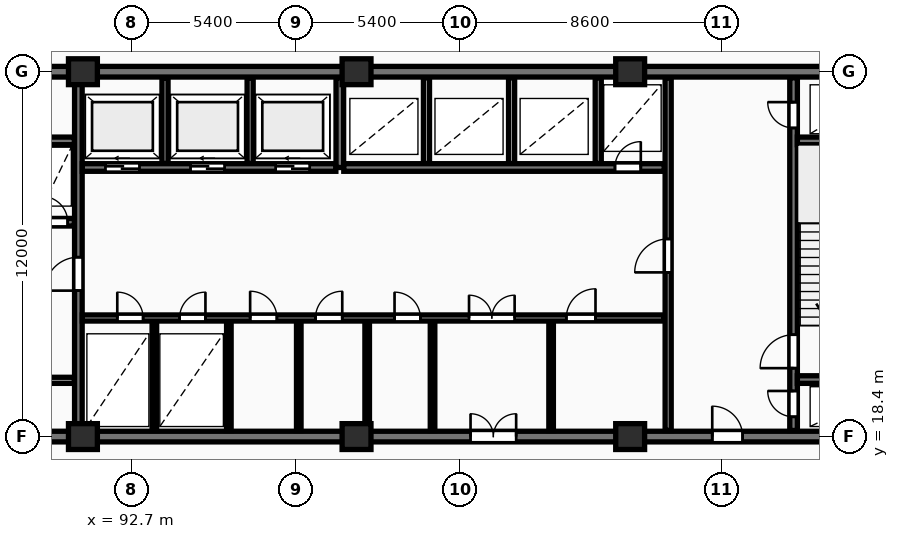
"""IFC4 building model, lengths in metres.
Left out: names, types, materials, properties, quantities, classifications, styles, units other than length and angle.
Written with IfcOpenShell. Run it as: python <this file> out.ifc"""

import sys

from ifc_helpers import new_model, si_unit, direction, frame, frame_2d, origin, origin_2d, place, context, subcontext, project, spatial, rectangle, extrude, element, fill, save


model = new_model("IFC4")
c1 = context("Model", 3, precision=1e-05, world=origin(), true_north=direction((0.0, 1.0)))
c2 = subcontext(c1, "Body", "Model", "MODEL_VIEW")
j1 = project(units=[si_unit("LENGTHUNIT", "METRE"), si_unit("PLANEANGLEUNIT", "RADIAN")], contexts=[c1])
p1 = place(None, origin())
s1 = spatial("IfcSite", under=j1, at=p1, CompositionType="ELEMENT")
p2 = place(p1, origin())
s2 = spatial("IfcBuilding", under=s1, at=p2, CompositionType="ELEMENT")
p3 = place(p2, frame((0.0, 0.0, 76.0)))
s3 = spatial("IfcBuildingStorey", under=s2, at=p3, CompositionType="ELEMENT", Elevation=76.0)
for number, where, z_axis, x_axis in (
    (1, (91.1, 18.4, 0.0), (0.0, 0.0, 1.0), (1.0, 0.0, 0.0)),
    (2, (91.1, 30.4, 0.0), (0.0, 0.0, 1.0), (1.0, 0.0, 0.0)),
    (3, (100.1, 18.4, 0.0), (0.0, 0.0, 1.0), (1.0, 0.0, 0.0)),
    (4, (100.1, 30.4, 0.0), (0.0, 0.0, 1.0), (1.0, 0.0, 0.0)),
    (5, (109.1, 18.4, 0.0), (0.0, 0.0, 1.0), (1.0, 0.0, 0.0)),
    (6, (109.1, 30.4, 0.0), (0.0, 0.0, 1.0), (1.0, 0.0, 0.0)),
):
    element("IfcColumn", number, at=place(p3, frame(where, z_axis=z_axis, x_axis=x_axis)), inside=s3, PredefinedType="COLUMN", context=c2, shape_type="SweptSolid", body=[
        extrude(rectangle(XDim=0.95, YDim=0.85, at=origin_2d()), origin(), (0.0, 0.0, 1.0), 4.8),
    ])
p4 = place(p3, frame((81.925, 30.4, 0.0), z_axis=(0.0, 0.0, 1.0), x_axis=(1.0, 0.0, 0.0)))
e7 = element("IfcWall", 7, at=p4, inside=s3, PredefinedType="SHEAR", context=c2, shape_type="SweptSolid", body=[
    extrude(rectangle(XDim=36.265, YDim=0.35, at=frame_2d((18.132, 0.0))), origin(), (0.0, 0.0, 1.0), 4.8),
])
p5 = place(p3, frame((81.925, 18.4, 0.0), z_axis=(0.0, 0.0, 1.0), x_axis=(1.0, 0.0, 0.0)))
e8 = element("IfcWall", 8, at=p5, inside=s3, PredefinedType="SHEAR", context=c2, shape_type="SweptSolid", body=[
    extrude(rectangle(XDim=36.265, YDim=0.35, at=frame_2d((18.132, 0.0))), origin(), (0.0, 0.0, 1.0), 4.8),
])
p6 = place(p5, frame((5.675, 0.0, 0.0)))
e9 = element("IfcOpeningElement", 9, at=p6, cuts=e8, PredefinedType="OPENING", context=c2, shape_type="SweptSolid", body=[
    extrude(rectangle(XDim=1.0, YDim=2.15, at=frame_2d((0.5, 1.075))), frame((0.0, 0.185, 0.0), z_axis=(0.0, -1.0, 0.0), x_axis=(1.0, 0.0, 0.0)), (0.0, 0.0, 1.0), 0.37),
])
p7 = place(p5, frame((21.925, 0.0, 0.0)))
e10 = element("IfcOpeningElement", 10, at=p7, cuts=e8, PredefinedType="OPENING", context=c2, shape_type="SweptSolid", body=[
    extrude(rectangle(XDim=1.5, YDim=2.2, at=frame_2d((0.75, 1.1))), frame((0.0, 0.185, 0.0), z_axis=(0.0, -1.0, 0.0), x_axis=(1.0, 0.0, 0.0)), (0.0, 0.0, 1.0), 0.37),
])
p8 = place(p5, frame((29.875, 0.0, 0.0)))
e11 = element("IfcOpeningElement", 11, at=p8, cuts=e8, PredefinedType="OPENING", context=c2, shape_type="SweptSolid", body=[
    extrude(rectangle(XDim=1.0, YDim=2.15, at=frame_2d((0.5, 1.075))), frame((0.0, 0.185, 0.0), z_axis=(0.0, -1.0, 0.0), x_axis=(1.0, 0.0, 0.0)), (0.0, 0.0, 1.0), 0.37),
])
p9 = place(p3, frame((83.0, 28.125, 0.0), z_axis=(0.0, 0.0, 1.0), x_axis=(1.0, 0.0, 0.0)))
e12 = element("IfcWall", 12, at=p9, inside=s3, PredefinedType="SHEAR", context=c2, shape_type="SweptSolid", body=[
    extrude(rectangle(XDim=7.82, YDim=0.25, at=frame_2d((3.91, 0.0))), origin(), (0.0, 0.0, 1.0), 4.8),
])
p10 = place(p3, frame((86.5, 25.45, 0.0), z_axis=(0.0, 0.0, 1.0), x_axis=(1.0, 0.0, 0.0)))
e13 = element("IfcWall", 13, at=p10, inside=s3, PredefinedType="SHEAR", context=c2, shape_type="SweptSolid", body=[
    extrude(rectangle(XDim=4.32, YDim=0.25, at=frame_2d((2.16, 0.0))), origin(), (0.0, 0.0, 1.0), 4.8),
])
p11 = place(p10, frame((1.14, 0.0, 0.0)))
e14 = element("IfcOpeningElement", 14, at=p11, cuts=e13, PredefinedType="OPENING", context=c2, shape_type="SweptSolid", body=[
    extrude(rectangle(XDim=1.12, YDim=2.12, at=frame_2d((0.56, 1.06))), frame((0.0, 0.135, 0.0), z_axis=(0.0, -1.0, 0.0), x_axis=(1.0, 0.0, 0.0)), (0.0, 0.0, 1.0), 0.27),
])
p12 = place(p10, frame((3.25, 0.0, 0.0)))
e15 = element("IfcOpeningElement", 15, at=p12, cuts=e13, PredefinedType="OPENING", context=c2, shape_type="SweptSolid", body=[
    extrude(rectangle(XDim=0.85, YDim=2.05, at=frame_2d((0.425, 1.025))), frame((0.0, 0.135, 0.0), z_axis=(0.0, -1.0, 0.0), x_axis=(1.0, 0.0, 0.0)), (0.0, 0.0, 1.0), 0.27),
])
p13 = place(p3, frame((86.5, 20.25, 0.0), z_axis=(0.0, 0.0, 1.0), x_axis=(1.0, 0.0, 0.0)))
e16 = element("IfcWall", 16, at=p13, inside=s3, PredefinedType="PARTITIONING", context=c2, shape_type="SweptSolid", body=[
    extrude(rectangle(XDim=4.32, YDim=0.2, at=frame_2d((2.16, 0.0))), origin(), (0.0, 0.0, 1.0), 4.48),
])
p14 = place(p13, frame((1.4, 0.0, 0.0)))
e17 = element("IfcOpeningElement", 17, at=p14, cuts=e16, PredefinedType="OPENING", context=c2, shape_type="SweptSolid", body=[
    extrude(rectangle(XDim=1.1, YDim=2.1, at=frame_2d((0.55, 1.05))), frame((0.0, 0.11, 0.0), z_axis=(0.0, -1.0, 0.0), x_axis=(1.0, 0.0, 0.0)), (0.0, 0.0, 1.0), 0.22),
])
p15 = place(p3, frame((90.95, 18.6, 0.0), z_axis=(0.0, 0.0, 1.0), x_axis=(0.0, 1.0, 0.0)))
e18 = element("IfcWall", 18, at=p15, inside=s3, PredefinedType="SHEAR", context=c2, shape_type="SweptSolid", body=[
    extrude(rectangle(XDim=11.6, YDim=0.25, at=frame_2d((5.8, 0.0))), origin(), (0.0, 0.0, 1.0), 4.8),
])
p16 = place(p15, frame((4.6, 0.0, 0.0)))
e19 = element("IfcOpeningElement", 19, at=p16, cuts=e18, PredefinedType="OPENING", context=c2, shape_type="SweptSolid", body=[
    extrude(rectangle(XDim=1.1, YDim=2.1, at=frame_2d((0.55, 1.05))), frame((0.0, 0.135, 0.0), z_axis=(0.0, -1.0, 0.0), x_axis=(1.0, 0.0, 0.0)), (0.0, 0.0, 1.0), 0.27),
])
for number, where, z_axis, x_axis in (
    (20, (93.8, 27.38, 0.0), (0.0, 0.0, 1.0), (0.0, 1.0, 0.0)),
    (21, (96.6, 27.38, 0.0), (0.0, 0.0, 1.0), (0.0, 1.0, 0.0)),
):
    element("IfcWall", number, at=place(p3, frame(where, z_axis=z_axis, x_axis=x_axis)), inside=s3, PredefinedType="PARTITIONING", context=c2, shape_type="SweptSolid", body=[
        extrude(rectangle(XDim=2.82, YDim=0.2, at=frame_2d((1.41, 0.0))), origin(), (0.0, 0.0, 1.0), 4.48),
    ])
p17 = place(p3, frame((91.08, 27.25, 0.0), z_axis=(0.0, 0.0, 1.0), x_axis=(1.0, 0.0, 0.0)))
e22 = element("IfcWall", 22, at=p17, inside=s3, PredefinedType="SHEAR", context=c2, shape_type="SweptSolid", body=[
    extrude(rectangle(XDim=8.34, YDim=0.25, at=frame_2d((4.17, 0.0))), origin(), (0.0, 0.0, 1.0), 4.8),
])
p18 = place(p17, frame((0.76, 0.0, 0.0)))
e23 = element("IfcOpeningElement", 23, at=p18, cuts=e22, PredefinedType="OPENING", context=c2, shape_type="SweptSolid", body=[
    extrude(rectangle(XDim=1.12, YDim=2.12, at=frame_2d((0.56, 1.06))), frame((0.0, 0.135, 0.0), z_axis=(0.0, -1.0, 0.0), x_axis=(1.0, 0.0, 0.0)), (0.0, 0.0, 1.0), 0.27),
])
p19 = place(p17, frame((3.56, 0.0, 0.0)))
e24 = element("IfcOpeningElement", 24, at=p19, cuts=e22, PredefinedType="OPENING", context=c2, shape_type="SweptSolid", body=[
    extrude(rectangle(XDim=1.12, YDim=2.12, at=frame_2d((0.56, 1.06))), frame((0.0, 0.135, 0.0), z_axis=(0.0, -1.0, 0.0), x_axis=(1.0, 0.0, 0.0)), (0.0, 0.0, 1.0), 0.27),
])
p20 = place(p17, frame((6.36, 0.0, 0.0)))
e25 = element("IfcOpeningElement", 25, at=p20, cuts=e22, PredefinedType="OPENING", context=c2, shape_type="SweptSolid", body=[
    extrude(rectangle(XDim=1.12, YDim=2.12, at=frame_2d((0.56, 1.06))), frame((0.0, 0.135, 0.0), z_axis=(0.0, -1.0, 0.0), x_axis=(1.0, 0.0, 0.0)), (0.0, 0.0, 1.0), 0.27),
])
p21 = place(p3, frame((99.55, 27.25, 0.0), z_axis=(0.0, 0.0, 1.0), x_axis=(0.0, 1.0, 0.0)))
e26 = element("IfcWall", 26, at=p21, inside=s3, PredefinedType="SHEAR", context=c2, shape_type="SweptSolid", body=[
    extrude(rectangle(XDim=2.95, YDim=0.25, at=frame_2d((1.475, 0.0))), origin(), (0.0, 0.0, 1.0), 4.8),
])
for number, where, z_axis, x_axis in (
    (27, (102.4, 27.38, 0.0), (0.0, 0.0, 1.0), (0.0, 1.0, 0.0)),
    (28, (105.2, 27.38, 0.0), (0.0, 0.0, 1.0), (0.0, 1.0, 0.0)),
    (29, (108.05, 27.38, 0.0), (0.0, 0.0, 1.0), (0.0, 1.0, 0.0)),
):
    element("IfcWall", number, at=place(p3, frame(where, z_axis=z_axis, x_axis=x_axis)), inside=s3, PredefinedType="PARTITIONING", context=c2, shape_type="SweptSolid", body=[
        extrude(rectangle(XDim=2.82, YDim=0.2, at=frame_2d((1.41, 0.0))), origin(), (0.0, 0.0, 1.0), 4.48),
    ])
p22 = place(p3, frame((99.68, 27.25, 0.0), z_axis=(0.0, 0.0, 1.0), x_axis=(1.0, 0.0, 0.0)))
e30 = element("IfcWall", 30, at=p22, inside=s3, PredefinedType="SHEAR", context=c2, shape_type="SweptSolid", body=[
    extrude(rectangle(XDim=10.54, YDim=0.25, at=frame_2d((5.27, 0.0))), origin(), (0.0, 0.0, 1.0), 4.8),
])
p23 = place(p22, frame((8.92, 0.0, 0.0)))
e31 = element("IfcOpeningElement", 31, at=p23, cuts=e30, PredefinedType="OPENING", context=c2, shape_type="SweptSolid", body=[
    extrude(rectangle(XDim=0.85, YDim=2.05, at=frame_2d((0.425, 1.025))), frame((0.0, 0.135, 0.0), z_axis=(0.0, -1.0, 0.0), x_axis=(1.0, 0.0, 0.0)), (0.0, 0.0, 1.0), 0.27),
])
for number, where, z_axis, x_axis in (
    (32, (93.45, 18.6, 0.0), (0.0, 0.0, 1.0), (0.0, 1.0, 0.0)),
    (33, (95.9, 18.6, 0.0), (0.0, 0.0, 1.0), (0.0, 1.0, 0.0)),
    (34, (98.2, 18.6, 0.0), (0.0, 0.0, 1.0), (0.0, 1.0, 0.0)),
):
    element("IfcWall", number, at=place(p3, frame(where, z_axis=z_axis, x_axis=x_axis)), inside=s3, PredefinedType="PARTITIONING", context=c2, shape_type="SweptSolid", body=[
        extrude(rectangle(XDim=3.6, YDim=0.15, at=frame_2d((1.8, 0.0))), origin(), (0.0, 0.0, 1.0), 4.48),
    ])
p24 = place(p3, frame((100.45, 18.6, 0.0), z_axis=(0.0, 0.0, 1.0), x_axis=(0.0, 1.0, 0.0)))
e35 = element("IfcWall", 35, at=p24, inside=s3, PredefinedType="PARTITIONING", context=c2, shape_type="SweptSolid", body=[
    extrude(rectangle(XDim=3.6, YDim=0.15, at=frame_2d((1.8, 0.0))), origin(), (0.0, 0.0, 1.0), 3.33),
])
for number, where, z_axis, x_axis in (
    (36, (102.6, 18.6, 0.0), (0.0, 0.0, 1.0), (0.0, 1.0, 0.0)),
    (37, (106.5, 18.6, 0.0), (0.0, 0.0, 1.0), (0.0, 1.0, 0.0)),
):
    element("IfcWall", number, at=place(p3, frame(where, z_axis=z_axis, x_axis=x_axis)), inside=s3, PredefinedType="PARTITIONING", context=c2, shape_type="SweptSolid", body=[
        extrude(rectangle(XDim=3.6, YDim=0.15, at=frame_2d((1.8, 0.0))), origin(), (0.0, 0.0, 1.0), 4.48),
    ])
p25 = place(p3, frame((91.08, 22.3, 0.0), z_axis=(0.0, 0.0, 1.0), x_axis=(1.0, 0.0, 0.0)))
e38 = element("IfcWall", 38, at=p25, inside=s3, PredefinedType="PARTITIONING", context=c2, shape_type="SweptSolid", body=[
    extrude(rectangle(XDim=19.14, YDim=0.2, at=frame_2d((9.57, 0.0))), origin(), (0.0, 0.0, 1.0), 4.48),
])
p26 = place(p25, frame((1.15, 0.0, 0.0)))
e39 = element("IfcOpeningElement", 39, at=p26, cuts=e38, PredefinedType="OPENING", context=c2, shape_type="SweptSolid", body=[
    extrude(rectangle(XDim=0.85, YDim=2.05, at=frame_2d((0.425, 1.025))), frame((0.0, 0.11, 0.0), z_axis=(0.0, -1.0, 0.0), x_axis=(1.0, 0.0, 0.0)), (0.0, 0.0, 1.0), 0.22),
])
p27 = place(p25, frame((3.2, 0.0, 0.0)))
e40 = element("IfcOpeningElement", 40, at=p27, cuts=e38, PredefinedType="OPENING", context=c2, shape_type="SweptSolid", body=[
    extrude(rectangle(XDim=0.85, YDim=2.05, at=frame_2d((0.425, 1.025))), frame((0.0, 0.11, 0.0), z_axis=(0.0, -1.0, 0.0), x_axis=(1.0, 0.0, 0.0)), (0.0, 0.0, 1.0), 0.22),
])
p28 = place(p25, frame((12.72, 0.0, 0.0)))
e41 = element("IfcOpeningElement", 41, at=p28, cuts=e38, PredefinedType="OPENING", context=c2, shape_type="SweptSolid", body=[
    extrude(rectangle(XDim=1.5, YDim=2.2, at=frame_2d((0.75, 1.1))), frame((0.0, 0.11, 0.0), z_axis=(0.0, -1.0, 0.0), x_axis=(1.0, 0.0, 0.0)), (0.0, 0.0, 1.0), 0.22),
])
p29 = place(p25, frame((5.52, 0.0, 0.0)))
e42 = element("IfcOpeningElement", 42, at=p29, cuts=e38, PredefinedType="OPENING", context=c2, shape_type="SweptSolid", body=[
    extrude(rectangle(XDim=0.88, YDim=2.06, at=frame_2d((0.44, 1.03))), frame((0.0, 0.11, 0.0), z_axis=(0.0, -1.0, 0.0), x_axis=(1.0, 0.0, 0.0)), (0.0, 0.0, 1.0), 0.22),
])
p30 = place(p25, frame((7.67, 0.0, 0.0)))
e43 = element("IfcOpeningElement", 43, at=p30, cuts=e38, PredefinedType="OPENING", context=c2, shape_type="SweptSolid", body=[
    extrude(rectangle(XDim=0.88, YDim=2.06, at=frame_2d((0.44, 1.03))), frame((0.0, 0.11, 0.0), z_axis=(0.0, -1.0, 0.0), x_axis=(1.0, 0.0, 0.0)), (0.0, 0.0, 1.0), 0.22),
])
p31 = place(p25, frame((10.27, 0.0, 0.0)))
e44 = element("IfcOpeningElement", 44, at=p31, cuts=e38, PredefinedType="OPENING", context=c2, shape_type="SweptSolid", body=[
    extrude(rectangle(XDim=0.85, YDim=2.05, at=frame_2d((0.425, 1.025))), frame((0.0, 0.11, 0.0), z_axis=(0.0, -1.0, 0.0), x_axis=(1.0, 0.0, 0.0)), (0.0, 0.0, 1.0), 0.22),
])
p32 = place(p25, frame((15.92, 0.0, 0.0)))
e45 = element("IfcOpeningElement", 45, at=p32, cuts=e38, PredefinedType="OPENING", context=c2, shape_type="SweptSolid", body=[
    extrude(rectangle(XDim=0.96, YDim=2.1, at=frame_2d((0.48, 1.05))), frame((0.0, 0.11, 0.0), z_axis=(0.0, -1.0, 0.0), x_axis=(1.0, 0.0, 0.0)), (0.0, 0.0, 1.0), 0.22),
])
p33 = place(p3, frame((110.35, 18.6, 0.0), z_axis=(0.0, 0.0, 1.0), x_axis=(0.0, 1.0, 0.0)))
e46 = element("IfcWall", 46, at=p33, inside=s3, PredefinedType="PARTITIONING", context=c2, shape_type="SweptSolid", body=[
    extrude(rectangle(XDim=11.6, YDim=0.2, at=frame_2d((5.8, 0.0))), origin(), (0.0, 0.0, 1.0), 4.48),
])
p34 = place(p33, frame((5.2, 0.0, 0.0)))
e47 = element("IfcOpeningElement", 47, at=p34, cuts=e46, PredefinedType="OPENING", context=c2, shape_type="SweptSolid", body=[
    extrude(rectangle(XDim=1.1, YDim=2.15, at=frame_2d((0.55, 1.075))), frame((0.0, 0.11, 0.0), z_axis=(0.0, -1.0, 0.0), x_axis=(1.0, 0.0, 0.0)), (0.0, 0.0, 1.0), 0.22),
])
p35 = place(p3, frame((114.475, 18.6, 0.0), z_axis=(0.0, 0.0, 1.0), x_axis=(0.0, 1.0, 0.0)))
e48 = element("IfcWall", 48, at=p35, inside=s3, PredefinedType="SHEAR", context=c2, shape_type="SweptSolid", body=[
    extrude(rectangle(XDim=11.6, YDim=0.25, at=frame_2d((5.8, 0.0))), origin(), (0.0, 0.0, 1.0), 4.8),
])
p36 = place(p35, frame((0.45, 0.0, 0.0)))
e49 = element("IfcOpeningElement", 49, at=p36, cuts=e48, PredefinedType="OPENING", context=c2, shape_type="SweptSolid", body=[
    extrude(rectangle(XDim=0.85, YDim=2.05, at=frame_2d((0.425, 1.025))), frame((0.0, 0.135, 0.0), z_axis=(0.0, -1.0, 0.0), x_axis=(1.0, 0.0, 0.0)), (0.0, 0.0, 1.0), 0.27),
])
p37 = place(p35, frame((2.05, 0.0, 0.0)))
e50 = element("IfcOpeningElement", 50, at=p37, cuts=e48, PredefinedType="OPENING", context=c2, shape_type="SweptSolid", body=[
    extrude(rectangle(XDim=1.1, YDim=2.1, at=frame_2d((0.55, 1.05))), frame((0.0, 0.135, 0.0), z_axis=(0.0, -1.0, 0.0), x_axis=(1.0, 0.0, 0.0)), (0.0, 0.0, 1.0), 0.27),
])
p38 = place(p35, frame((9.95, 0.0, 0.0)))
e51 = element("IfcOpeningElement", 51, at=p38, cuts=e48, PredefinedType="OPENING", context=c2, shape_type="SweptSolid", body=[
    extrude(rectangle(XDim=0.85, YDim=2.05, at=frame_2d((0.425, 1.025))), frame((0.0, 0.135, 0.0), z_axis=(0.0, -1.0, 0.0), x_axis=(1.0, 0.0, 0.0)), (0.0, 0.0, 1.0), 0.27),
])
for number, where, z_axis, x_axis in (
    (52, (114.6, 20.275, 0.0), (0.0, 0.0, 1.0), (1.0, 0.0, 0.0)),
    (53, (114.6, 28.125, 0.0), (0.0, 0.0, 1.0), (1.0, 0.0, 0.0)),
):
    element("IfcWall", number, at=place(p3, frame(where, z_axis=z_axis, x_axis=x_axis)), inside=s3, PredefinedType="SHEAR", context=c2, shape_type="SweptSolid", body=[
        extrude(rectangle(XDim=3.24, YDim=0.25, at=frame_2d((1.62, 0.0))), origin(), (0.0, 0.0, 1.0), 4.8),
    ])
p39 = place(p7, origin())
e54 = element("IfcDoor", 54, at=p39, inside=s3, OperationType="DOUBLE_DOOR_SINGLE_SWING", PredefinedType="DOOR", context=c2, shape_type="SweptSolid", body=[
    extrude(rectangle(XDim=1.5, YDim=2.2, at=frame_2d((0.75, 1.1))), frame((0.0, 0.025, 0.0), z_axis=(0.0, -1.0, 0.0), x_axis=(1.0, 0.0, 0.0)), (0.0, 0.0, 1.0), 0.05),
])
fill(e10, e54)
p40 = place(p8, origin())
e55 = element("IfcDoor", 55, at=p40, inside=s3, OperationType="SINGLE_SWING_LEFT", PredefinedType="DOOR", context=c2, shape_type="SweptSolid", body=[
    extrude(rectangle(XDim=1.0, YDim=2.15, at=frame_2d((0.5, 1.075))), frame((0.0, 0.025, 0.0), z_axis=(0.0, -1.0, 0.0), x_axis=(1.0, 0.0, 0.0)), (0.0, 0.0, 1.0), 0.05),
])
fill(e11, e55)
p41 = place(p12, origin())
e56 = element("IfcDoor", 56, at=p41, inside=s3, OperationType="SINGLE_SWING_LEFT", PredefinedType="DOOR", context=c2, shape_type="SweptSolid", body=[
    extrude(rectangle(XDim=0.85, YDim=2.05, at=frame_2d((0.425, 1.025))), frame((0.0, 0.025, 0.0), z_axis=(0.0, -1.0, 0.0), x_axis=(1.0, 0.0, 0.0)), (0.0, 0.0, 1.0), 0.05),
])
fill(e15, e56)
p42 = place(p16, origin())
e57 = element("IfcDoor", 57, at=p42, inside=s3, OperationType="SINGLE_SWING_LEFT", PredefinedType="DOOR", context=c2, shape_type="SweptSolid", body=[
    extrude(rectangle(XDim=1.1, YDim=2.1, at=frame_2d((0.55, 1.05))), frame((0.0, 0.025, 0.0), z_axis=(0.0, -1.0, 0.0), x_axis=(1.0, 0.0, 0.0)), (0.0, 0.0, 1.0), 0.05),
])
fill(e19, e57)
p43 = place(p18, origin())
e58 = element("IfcDoor", 58, at=p43, inside=s3, OperationType="SLIDING_TO_LEFT", PredefinedType="DOOR", context=c2, shape_type="SweptSolid", body=[
    extrude(rectangle(XDim=1.12, YDim=2.12, at=frame_2d((0.56, 1.06))), frame((0.0, 0.025, 0.0), z_axis=(0.0, -1.0, 0.0), x_axis=(1.0, 0.0, 0.0)), (0.0, 0.0, 1.0), 0.05),
])
fill(e23, e58)
p44 = place(p19, origin())
e59 = element("IfcDoor", 59, at=p44, inside=s3, OperationType="SLIDING_TO_LEFT", PredefinedType="DOOR", context=c2, shape_type="SweptSolid", body=[
    extrude(rectangle(XDim=1.12, YDim=2.12, at=frame_2d((0.56, 1.06))), frame((0.0, 0.025, 0.0), z_axis=(0.0, -1.0, 0.0), x_axis=(1.0, 0.0, 0.0)), (0.0, 0.0, 1.0), 0.05),
])
fill(e24, e59)
p45 = place(p20, origin())
e60 = element("IfcDoor", 60, at=p45, inside=s3, OperationType="SLIDING_TO_LEFT", PredefinedType="DOOR", context=c2, shape_type="SweptSolid", body=[
    extrude(rectangle(XDim=1.12, YDim=2.12, at=frame_2d((0.56, 1.06))), frame((0.0, 0.025, 0.0), z_axis=(0.0, -1.0, 0.0), x_axis=(1.0, 0.0, 0.0)), (0.0, 0.0, 1.0), 0.05),
])
fill(e25, e60)
p46 = place(p23, origin())
e61 = element("IfcDoor", 61, at=p46, inside=s3, OperationType="SINGLE_SWING_RIGHT", PredefinedType="DOOR", context=c2, shape_type="SweptSolid", body=[
    extrude(rectangle(XDim=0.85, YDim=2.05, at=frame_2d((0.425, 1.025))), frame((0.0, 0.025, 0.0), z_axis=(0.0, -1.0, 0.0), x_axis=(1.0, 0.0, 0.0)), (0.0, 0.0, 1.0), 0.05),
])
fill(e31, e61)
p47 = place(p26, origin())
e62 = element("IfcDoor", 62, at=p47, inside=s3, OperationType="SINGLE_SWING_LEFT", PredefinedType="DOOR", context=c2, shape_type="SweptSolid", body=[
    extrude(rectangle(XDim=0.85, YDim=2.05, at=frame_2d((0.425, 1.025))), frame((0.0, 0.025, 0.0), z_axis=(0.0, -1.0, 0.0), x_axis=(1.0, 0.0, 0.0)), (0.0, 0.0, 1.0), 0.05),
])
fill(e39, e62)
p48 = place(p27, origin())
e63 = element("IfcDoor", 63, at=p48, inside=s3, OperationType="SINGLE_SWING_RIGHT", PredefinedType="DOOR", context=c2, shape_type="SweptSolid", body=[
    extrude(rectangle(XDim=0.85, YDim=2.05, at=frame_2d((0.425, 1.025))), frame((0.0, 0.025, 0.0), z_axis=(0.0, -1.0, 0.0), x_axis=(1.0, 0.0, 0.0)), (0.0, 0.0, 1.0), 0.05),
])
fill(e40, e63)
p49 = place(p28, origin())
e64 = element("IfcDoor", 64, at=p49, inside=s3, OperationType="DOUBLE_DOOR_SINGLE_SWING", PredefinedType="DOOR", context=c2, shape_type="SweptSolid", body=[
    extrude(rectangle(XDim=1.5, YDim=2.2, at=frame_2d((0.75, 1.1))), frame((0.0, 0.025, 0.0), z_axis=(0.0, -1.0, 0.0), x_axis=(1.0, 0.0, 0.0)), (0.0, 0.0, 1.0), 0.05),
])
fill(e41, e64)
p50 = place(p29, origin())
e65 = element("IfcDoor", 65, at=p50, inside=s3, OperationType="SINGLE_SWING_LEFT", PredefinedType="DOOR", context=c2, shape_type="SweptSolid", body=[
    extrude(rectangle(XDim=0.88, YDim=2.06, at=frame_2d((0.44, 1.03))), frame((0.0, 0.025, 0.0), z_axis=(0.0, -1.0, 0.0), x_axis=(1.0, 0.0, 0.0)), (0.0, 0.0, 1.0), 0.05),
])
fill(e42, e65)
p51 = place(p30, origin())
e66 = element("IfcDoor", 66, at=p51, inside=s3, OperationType="SINGLE_SWING_RIGHT", PredefinedType="DOOR", context=c2, shape_type="SweptSolid", body=[
    extrude(rectangle(XDim=0.88, YDim=2.06, at=frame_2d((0.44, 1.03))), frame((0.0, 0.025, 0.0), z_axis=(0.0, -1.0, 0.0), x_axis=(1.0, 0.0, 0.0)), (0.0, 0.0, 1.0), 0.05),
])
fill(e43, e66)
p52 = place(p31, origin())
e67 = element("IfcDoor", 67, at=p52, inside=s3, OperationType="SINGLE_SWING_LEFT", PredefinedType="DOOR", context=c2, shape_type="SweptSolid", body=[
    extrude(rectangle(XDim=0.85, YDim=2.05, at=frame_2d((0.425, 1.025))), frame((0.0, 0.025, 0.0), z_axis=(0.0, -1.0, 0.0), x_axis=(1.0, 0.0, 0.0)), (0.0, 0.0, 1.0), 0.05),
])
fill(e44, e67)
p53 = place(p32, origin())
e68 = element("IfcDoor", 68, at=p53, inside=s3, OperationType="SINGLE_SWING_RIGHT", PredefinedType="DOOR", context=c2, shape_type="SweptSolid", body=[
    extrude(rectangle(XDim=0.96, YDim=2.1, at=frame_2d((0.48, 1.05))), frame((0.0, 0.025, 0.0), z_axis=(0.0, -1.0, 0.0), x_axis=(1.0, 0.0, 0.0)), (0.0, 0.0, 1.0), 0.05),
])
fill(e45, e68)
p54 = place(p34, origin())
e69 = element("IfcDoor", 69, at=p54, inside=s3, OperationType="SINGLE_SWING_LEFT", PredefinedType="DOOR", context=c2, shape_type="SweptSolid", body=[
    extrude(rectangle(XDim=1.1, YDim=2.15, at=frame_2d((0.55, 1.075))), frame((0.0, 0.025, 0.0), z_axis=(0.0, -1.0, 0.0), x_axis=(1.0, 0.0, 0.0)), (0.0, 0.0, 1.0), 0.05),
])
fill(e47, e69)
p55 = place(p36, origin())
e70 = element("IfcDoor", 70, at=p55, inside=s3, OperationType="SINGLE_SWING_RIGHT", PredefinedType="DOOR", context=c2, shape_type="SweptSolid", body=[
    extrude(rectangle(XDim=0.85, YDim=2.05, at=frame_2d((0.425, 1.025))), frame((0.0, 0.025, 0.0), z_axis=(0.0, -1.0, 0.0), x_axis=(1.0, 0.0, 0.0)), (0.0, 0.0, 1.0), 0.05),
])
fill(e49, e70)
p56 = place(p37, origin())
e71 = element("IfcDoor", 71, at=p56, inside=s3, OperationType="SINGLE_SWING_LEFT", PredefinedType="DOOR", context=c2, shape_type="SweptSolid", body=[
    extrude(rectangle(XDim=1.1, YDim=2.1, at=frame_2d((0.55, 1.05))), frame((0.0, 0.025, 0.0), z_axis=(0.0, -1.0, 0.0), x_axis=(1.0, 0.0, 0.0)), (0.0, 0.0, 1.0), 0.05),
])
fill(e50, e71)
p57 = place(p38, origin())
e72 = element("IfcDoor", 72, at=p57, inside=s3, OperationType="SINGLE_SWING_RIGHT", PredefinedType="DOOR", context=c2, shape_type="SweptSolid", body=[
    extrude(rectangle(XDim=0.85, YDim=2.05, at=frame_2d((0.425, 1.025))), frame((0.0, 0.025, 0.0), z_axis=(0.0, -1.0, 0.0), x_axis=(1.0, 0.0, 0.0)), (0.0, 0.0, 1.0), 0.05),
])
fill(e51, e72)
save(model, sys.argv[1])
